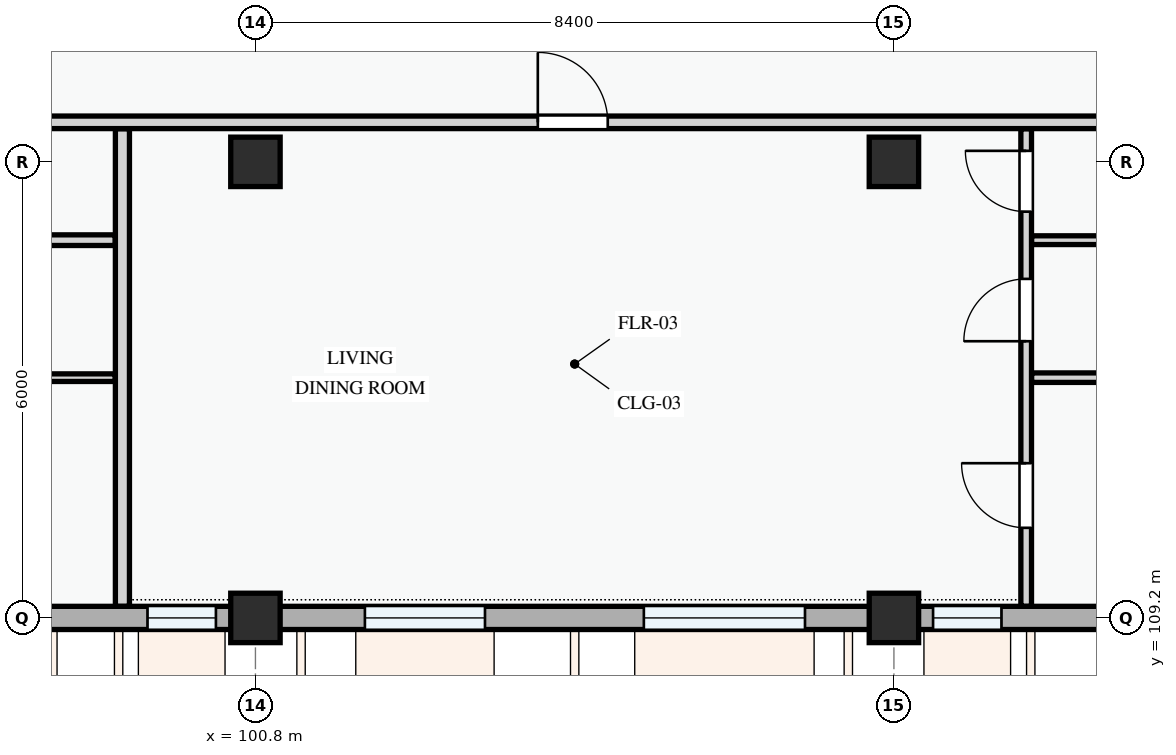
"""IFC4 building model, lengths in metres.
Left out: names, types, materials, properties, quantities, classifications, styles, units other than length and angle.
Written with IfcOpenShell. Run it as: python <this file> out.ifc"""

import sys

from ifc_helpers import new_model, si_unit, direction, frame, frame_2d, origin, origin_2d, place, context, subcontext, project, spatial, rectangle, extrude, element, fill, save


model = new_model("IFC4")
c1 = context("Model", 3, precision=1e-05, world=origin(), true_north=direction((0.0, 1.0)))
c2 = subcontext(c1, "Body", "Model", "MODEL_VIEW")
j1 = project(units=[si_unit("LENGTHUNIT", "METRE"), si_unit("PLANEANGLEUNIT", "RADIAN")], contexts=[c1])
p1 = place(None, origin())
s1 = spatial("IfcSite", under=j1, at=p1, CompositionType="ELEMENT")
p2 = place(p1, origin())
s2 = spatial("IfcBuilding", under=s1, at=p2, CompositionType="ELEMENT")
p3 = place(p2, frame((0.0, 0.0, 21.3)))
s3 = spatial("IfcBuildingStorey", under=s2, at=p3, CompositionType="ELEMENT", Elevation=21.3)
for number, where, z_axis, x_axis in (
    (1, (100.8, 109.2, 0.0), (0.0, 0.0, 1.0), (1.0, 0.0, 0.0)),
    (2, (100.8, 115.2, 0.0), (0.0, 0.0, 1.0), (1.0, 0.0, 0.0)),
    (3, (109.2, 109.2, 0.0), (0.0, 0.0, 1.0), (1.0, 0.0, 0.0)),
    (4, (109.2, 115.2, 0.0), (0.0, 0.0, 1.0), (1.0, 0.0, 0.0)),
):
    element("IfcColumn", number, at=place(p3, frame(where, z_axis=z_axis, x_axis=x_axis)), inside=s3, PredefinedType="COLUMN", context=c2, shape_type="SweptSolid", body=[
        extrude(rectangle(XDim=0.65, YDim=0.65, at=origin_2d()), origin(), (0.0, 0.0, 1.0), 3.3),
    ])
p4 = place(p3, frame((94.8, 109.2, 0.0), z_axis=(0.0, 0.0, 1.0), x_axis=(1.0, 0.0, 0.0)))
e5 = element("IfcWall", 5, at=p4, inside=s3, PredefinedType="STANDARD", context=c2, shape_type="SweptSolid", body=[
    extrude(rectangle(XDim=6.0, YDim=0.305, at=frame_2d((3.0, 0.0))), origin(), (0.0, 0.0, 1.0), 2.475),
])
p5 = place(p4, frame((1.17, 0.0, 0.78)))
e6 = element("IfcOpeningElement", 6, at=p5, cuts=e5, PredefinedType="OPENING", context=c2, shape_type="SweptSolid", body=[
    extrude(rectangle(XDim=2.1, YDim=1.55, at=frame_2d((1.05, 0.775))), frame((0.0, 0.163, 0.0), z_axis=(0.0, -1.0, 0.0), x_axis=(1.0, 0.0, 0.0)), (0.0, 0.0, 1.0), 0.325),
])
p6 = place(p4, frame((4.58, 0.0, 0.78)))
e7 = element("IfcOpeningElement", 7, at=p6, cuts=e5, PredefinedType="OPENING", context=c2, shape_type="SweptSolid", body=[
    extrude(rectangle(XDim=0.9, YDim=1.2, at=frame_2d((0.45, 0.6))), frame((0.0, 0.163, 0.0), z_axis=(0.0, -1.0, 0.0), x_axis=(1.0, 0.0, 0.0)), (0.0, 0.0, 1.0), 0.325),
])
p7 = place(p3, frame((100.8, 109.2, 0.0), z_axis=(0.0, 0.0, 1.0), x_axis=(1.0, 0.0, 0.0)))
e8 = element("IfcWall", 8, at=p7, inside=s3, PredefinedType="STANDARD", context=c2, shape_type="SweptSolid", body=[
    extrude(rectangle(XDim=8.4, YDim=0.305, at=frame_2d((4.2, 0.0))), origin(), (0.0, 0.0, 1.0), 2.375),
])
p8 = place(p7, frame((1.44, 0.0, 0.78)))
e9 = element("IfcOpeningElement", 9, at=p8, cuts=e8, PredefinedType="OPENING", context=c2, shape_type="SweptSolid", body=[
    extrude(rectangle(XDim=1.58, YDim=1.48, at=frame_2d((0.79, 0.74))), frame((0.0, 0.163, 0.0), z_axis=(0.0, -1.0, 0.0), x_axis=(1.0, 0.0, 0.0)), (0.0, 0.0, 1.0), 0.325),
])
p9 = place(p7, frame((5.11, 0.0, 0.78)))
e10 = element("IfcOpeningElement", 10, at=p9, cuts=e8, PredefinedType="OPENING", context=c2, shape_type="SweptSolid", body=[
    extrude(rectangle(XDim=2.12, YDim=1.44, at=frame_2d((1.06, 0.72))), frame((0.0, 0.163, 0.0), z_axis=(0.0, -1.0, 0.0), x_axis=(1.0, 0.0, 0.0)), (0.0, 0.0, 1.0), 0.325),
])
p10 = place(p3, frame((109.2, 109.2, 0.0), z_axis=(0.0, 0.0, 1.0), x_axis=(1.0, 0.0, 0.0)))
e11 = element("IfcWall", 11, at=p10, inside=s3, PredefinedType="STANDARD", context=c2, shape_type="SweptSolid", body=[
    extrude(rectangle(XDim=6.0, YDim=0.305, at=frame_2d((3.0, 0.0))), origin(), (0.0, 0.0, 1.0), 2.475),
])
p11 = place(p10, frame((0.515, 0.0, 0.78)))
e12 = element("IfcOpeningElement", 12, at=p11, cuts=e11, PredefinedType="OPENING", context=c2, shape_type="SweptSolid", body=[
    extrude(rectangle(XDim=0.9, YDim=1.2, at=frame_2d((0.45, 0.6))), frame((0.0, 0.163, 0.0), z_axis=(0.0, -1.0, 0.0), x_axis=(1.0, 0.0, 0.0)), (0.0, 0.0, 1.0), 0.325),
])
p12 = place(p10, frame((3.15, 0.0, 0.78)))
e13 = element("IfcOpeningElement", 13, at=p12, cuts=e11, PredefinedType="OPENING", context=c2, shape_type="SweptSolid", body=[
    extrude(rectangle(XDim=1.25, YDim=1.45, at=frame_2d((0.625, 0.725))), frame((0.0, 0.163, 0.0), z_axis=(0.0, -1.0, 0.0), x_axis=(1.0, 0.0, 0.0)), (0.0, 0.0, 1.0), 0.325),
])
p13 = place(p3, frame((89.814, 112.361, 0.0), z_axis=(0.0, 0.0, 1.0), x_axis=(1.0, 0.0, 0.0)))
e14 = element("IfcWall", 14, at=p13, inside=s3, PredefinedType="PARTITIONING", context=c2, shape_type="SweptSolid", body=[
    extrude(rectangle(XDim=9.141, YDim=0.1, at=frame_2d((4.571, 0.0))), origin(), (0.0, 0.0, 1.0), 3.0),
])
p14 = place(p3, frame((89.814, 114.17, 0.0), z_axis=(0.0, 0.0, 1.0), x_axis=(1.0, 0.0, 0.0)))
e15 = element("IfcWall", 15, at=p14, inside=s3, PredefinedType="PARTITIONING", context=c2, shape_type="SweptSolid", body=[
    extrude(rectangle(XDim=9.141, YDim=0.14, at=frame_2d((4.571, 0.0))), origin(), (0.0, 0.0, 1.0), 3.0),
])
p15 = place(p3, frame((110.94, 109.354, 0.0), z_axis=(0.0, 0.0, 1.0), x_axis=(0.0, 1.0, 0.0)))
e16 = element("IfcWall", 16, at=p15, inside=s3, PredefinedType="PARTITIONING", context=c2, shape_type="SweptSolid", body=[
    extrude(rectangle(XDim=6.281, YDim=0.14, at=frame_2d((3.141, 0.0))), origin(), (0.0, 0.0, 1.0), 3.0),
])
p16 = place(p15, frame((1.031, 0.0, 0.0)))
e17 = element("IfcOpeningElement", 17, at=p16, cuts=e16, PredefinedType="OPENING", context=c2, shape_type="SweptSolid", body=[
    extrude(rectangle(XDim=0.85, YDim=2.1, at=frame_2d((0.425, 1.05))), frame((0.0, 0.08, 0.0), z_axis=(0.0, -1.0, 0.0), x_axis=(1.0, 0.0, 0.0)), (0.0, 0.0, 1.0), 0.16),
])
p17 = place(p15, frame((3.486, 0.0, 0.0)))
e18 = element("IfcOpeningElement", 18, at=p17, cuts=e16, PredefinedType="OPENING", context=c2, shape_type="SweptSolid", body=[
    extrude(rectangle(XDim=0.82, YDim=2.08, at=frame_2d((0.41, 1.04))), frame((0.0, 0.08, 0.0), z_axis=(0.0, -1.0, 0.0), x_axis=(1.0, 0.0, 0.0)), (0.0, 0.0, 1.0), 0.16),
])
p18 = place(p15, frame((5.19, 0.0, 0.0)))
e19 = element("IfcOpeningElement", 19, at=p18, cuts=e16, PredefinedType="OPENING", context=c2, shape_type="SweptSolid", body=[
    extrude(rectangle(XDim=0.8, YDim=2.1, at=frame_2d((0.4, 1.05))), frame((0.0, 0.08, 0.0), z_axis=(0.0, -1.0, 0.0), x_axis=(1.0, 0.0, 0.0)), (0.0, 0.0, 1.0), 0.16),
])
p19 = place(p3, frame((111.012, 112.361, 0.0), z_axis=(0.0, 0.0, 1.0), x_axis=(1.0, 0.0, 0.0)))
e20 = element("IfcWall", 20, at=p19, inside=s3, PredefinedType="PARTITIONING", context=c2, shape_type="SweptSolid", body=[
    extrude(rectangle(XDim=8.306, YDim=0.125, at=frame_2d((4.153, 0.0))), origin(), (0.0, 0.0, 1.0), 3.0),
])
p20 = place(p3, frame((111.012, 114.17, 0.0), z_axis=(0.0, 0.0, 1.0), x_axis=(1.0, 0.0, 0.0)))
e21 = element("IfcWall", 21, at=p20, inside=s3, PredefinedType="PARTITIONING", context=c2, shape_type="SweptSolid", body=[
    extrude(rectangle(XDim=8.306, YDim=0.115, at=frame_2d((4.153, 0.0))), origin(), (0.0, 0.0, 1.0), 3.0),
])
p21 = place(p3, frame((99.05, 109.354, 0.0), z_axis=(0.0, 0.0, 1.0), x_axis=(0.0, 1.0, 0.0)))
e22 = element("IfcWall", 22, at=p21, inside=s3, PredefinedType="PARTITIONING", context=c2, shape_type="SweptSolid", body=[
    extrude(rectangle(XDim=6.281, YDim=0.185, at=frame_2d((3.141, 0.0))), origin(), (0.0, 0.0, 1.0), 3.0),
])
p22 = place(p3, frame((80.554, 115.72, 0.0), z_axis=(0.0, 0.0, 1.0), x_axis=(1.0, 0.0, 0.0)))
e23 = element("IfcWall", 23, at=p22, inside=s3, PredefinedType="PARTITIONING", context=c2, shape_type="SweptSolid", body=[
    extrude(rectangle(XDim=69.496, YDim=0.165, at=frame_2d((34.748, 0.0))), origin(), (0.0, 0.0, 1.0), 3.0),
])
p23 = place(p22, frame((2.359, 0.0, 0.0)))
e24 = element("IfcOpeningElement", 24, at=p23, cuts=e23, PredefinedType="OPENING", context=c2, shape_type="SweptSolid", body=[
    extrude(rectangle(XDim=0.96, YDim=2.12, at=frame_2d((0.48, 1.06))), frame((0.0, 0.093, 0.0), z_axis=(0.0, -1.0, 0.0), x_axis=(1.0, 0.0, 0.0)), (0.0, 0.0, 1.0), 0.185),
])
p24 = place(p22, frame((23.96, 0.0, 0.0)))
e25 = element("IfcOpeningElement", 25, at=p24, cuts=e23, PredefinedType="OPENING", context=c2, shape_type="SweptSolid", body=[
    extrude(rectangle(XDim=0.92, YDim=2.1, at=frame_2d((0.46, 1.05))), frame((0.0, 0.093, 0.0), z_axis=(0.0, -1.0, 0.0), x_axis=(1.0, 0.0, 0.0)), (0.0, 0.0, 1.0), 0.185),
])
p25 = place(p22, frame((39.125, 0.0, 0.0)))
e26 = element("IfcOpeningElement", 26, at=p25, cuts=e23, PredefinedType="OPENING", context=c2, shape_type="SweptSolid", body=[
    extrude(rectangle(XDim=0.92, YDim=2.1, at=frame_2d((0.46, 1.05))), frame((0.0, 0.093, 0.0), z_axis=(0.0, -1.0, 0.0), x_axis=(1.0, 0.0, 0.0)), (0.0, 0.0, 1.0), 0.185),
])
p26 = place(p22, frame((59.901, 0.0, 0.0)))
e27 = element("IfcOpeningElement", 27, at=p26, cuts=e23, PredefinedType="OPENING", context=c2, shape_type="SweptSolid", body=[
    extrude(rectangle(XDim=0.92, YDim=2.1, at=frame_2d((0.46, 1.05))), frame((0.0, 0.093, 0.0), z_axis=(0.0, -1.0, 0.0), x_axis=(1.0, 0.0, 0.0)), (0.0, 0.0, 1.0), 0.185),
])
p27 = place(p6, origin())
e28 = element("IfcWindow", 28, at=p27, inside=s3, PartitioningType="SINGLE_PANEL", PredefinedType="WINDOW", context=c2, shape_type="SweptSolid", body=[
    extrude(rectangle(XDim=0.9, YDim=1.2, at=frame_2d((0.45, 0.6))), frame((0.0, 0.03, 0.0), z_axis=(0.0, -1.0, 0.0), x_axis=(1.0, 0.0, 0.0)), (0.0, 0.0, 1.0), 0.06),
])
fill(e7, e28)
p28 = place(p8, origin())
e29 = element("IfcWindow", 29, at=p28, inside=s3, PartitioningType="SINGLE_PANEL", PredefinedType="WINDOW", context=c2, shape_type="SweptSolid", body=[
    extrude(rectangle(XDim=1.58, YDim=1.48, at=frame_2d((0.79, 0.74))), frame((0.0, 0.03, 0.0), z_axis=(0.0, -1.0, 0.0), x_axis=(1.0, 0.0, 0.0)), (0.0, 0.0, 1.0), 0.06),
])
fill(e9, e29)
p29 = place(p9, origin())
e30 = element("IfcWindow", 30, at=p29, inside=s3, PartitioningType="DOUBLE_PANEL_VERTICAL", PredefinedType="WINDOW", context=c2, shape_type="SweptSolid", body=[
    extrude(rectangle(XDim=2.12, YDim=1.44, at=frame_2d((1.06, 0.72))), frame((0.0, 0.03, 0.0), z_axis=(0.0, -1.0, 0.0), x_axis=(1.0, 0.0, 0.0)), (0.0, 0.0, 1.0), 0.06),
])
fill(e10, e30)
p30 = place(p11, origin())
e31 = element("IfcWindow", 31, at=p30, inside=s3, PartitioningType="SINGLE_PANEL", PredefinedType="WINDOW", context=c2, shape_type="SweptSolid", body=[
    extrude(rectangle(XDim=0.9, YDim=1.2, at=frame_2d((0.45, 0.6))), frame((0.0, 0.03, 0.0), z_axis=(0.0, -1.0, 0.0), x_axis=(1.0, 0.0, 0.0)), (0.0, 0.0, 1.0), 0.06),
])
fill(e12, e31)
p31 = place(p16, origin())
e32 = element("IfcDoor", 32, at=p31, inside=s3, OperationType="SINGLE_SWING_RIGHT", PredefinedType="DOOR", context=c2, shape_type="SweptSolid", body=[
    extrude(rectangle(XDim=0.85, YDim=2.1, at=frame_2d((0.425, 1.05))), frame((0.0, 0.025, 0.0), z_axis=(0.0, -1.0, 0.0), x_axis=(1.0, 0.0, 0.0)), (0.0, 0.0, 1.0), 0.05),
])
fill(e17, e32)
p32 = place(p17, origin())
e33 = element("IfcDoor", 33, at=p32, inside=s3, OperationType="SINGLE_SWING_LEFT", PredefinedType="DOOR", context=c2, shape_type="SweptSolid", body=[
    extrude(rectangle(XDim=0.82, YDim=2.08, at=frame_2d((0.41, 1.04))), frame((0.0, 0.025, 0.0), z_axis=(0.0, -1.0, 0.0), x_axis=(1.0, 0.0, 0.0)), (0.0, 0.0, 1.0), 0.05),
])
fill(e18, e33)
p33 = place(p18, origin())
e34 = element("IfcDoor", 34, at=p33, inside=s3, OperationType="SINGLE_SWING_RIGHT", PredefinedType="DOOR", context=c2, shape_type="SweptSolid", body=[
    extrude(rectangle(XDim=0.8, YDim=2.1, at=frame_2d((0.4, 1.05))), frame((0.0, 0.025, 0.0), z_axis=(0.0, -1.0, 0.0), x_axis=(1.0, 0.0, 0.0)), (0.0, 0.0, 1.0), 0.05),
])
fill(e19, e34)
p34 = place(p24, origin())
e35 = element("IfcDoor", 35, at=p34, inside=s3, OperationType="SINGLE_SWING_LEFT", PredefinedType="DOOR", context=c2, shape_type="SweptSolid", body=[
    extrude(rectangle(XDim=0.92, YDim=2.1, at=frame_2d((0.46, 1.05))), frame((0.0, 0.025, 0.0), z_axis=(0.0, -1.0, 0.0), x_axis=(1.0, 0.0, 0.0)), (0.0, 0.0, 1.0), 0.05),
])
fill(e25, e35)
save(model, sys.argv[1])
